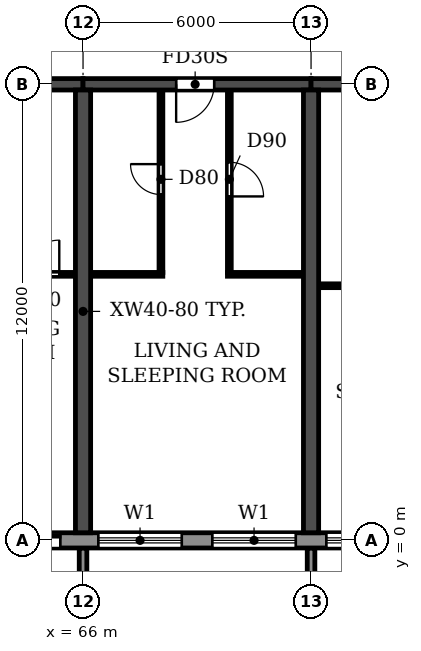
"""IFC4 building model, lengths in metres.
Left out: names, types, materials, properties, quantities, classifications, styles, units other than length and angle.
Written with IfcOpenShell. Run it as: python <this file> out.ifc"""

import sys

from ifc_helpers import new_model, si_unit, direction, frame, frame_2d, origin, place, context, subcontext, project, spatial, polyline, rectangle, outline, extrude, source, transform, mapped, element, fill, save


model = new_model("IFC4")
c1 = context("Model", 3, precision=1e-05, world=origin(), true_north=direction((0.0, 1.0)))
c2 = subcontext(c1, "Body", "Model", "MODEL_VIEW")
j1 = project(units=[si_unit("LENGTHUNIT", "METRE"), si_unit("PLANEANGLEUNIT", "RADIAN")], contexts=[c1])
p1 = place(None, origin())
s1 = spatial("IfcSite", under=j1, at=p1, CompositionType="ELEMENT")
p2 = place(p1, origin())
s2 = spatial("IfcBuilding", under=s1, at=p2, CompositionType="ELEMENT")
p3 = place(p2, frame((0.0, 0.0, 26.7)))
s3 = spatial("IfcBuildingStorey", under=s2, at=p3, CompositionType="ELEMENT", Elevation=26.7)
for number, where, z_axis, x_axis in (
    (1, (66.0, 0.2, 0.0), (0.0, 0.0, 1.0), (0.0, 1.0, 0.0)),
    (2, (72.0, 0.2, 0.0), (0.0, 0.0, 1.0), (0.0, 1.0, 0.0)),
):
    element("IfcWall", number, at=place(p3, frame(where, z_axis=z_axis, x_axis=x_axis)), inside=s3, PredefinedType="SHEAR", context=c2, shape_type="SweptSolid", body=[
        extrude(rectangle(XDim=11.65, YDim=0.4, at=frame_2d((5.825, 0.0))), origin(), (0.0, 0.0, 1.0), 3.05),
    ])
p4 = place(p3, frame((60.0, 12.0, 0.0), z_axis=(0.0, 0.0, 1.0), x_axis=(1.0, 0.0, 0.0)))
e3 = element("IfcWall", 3, at=p4, inside=s3, PredefinedType="SHEAR", context=c2, shape_type="SweptSolid", body=[
    extrude(rectangle(XDim=6.0, YDim=0.3, at=frame_2d((3.0, 0.0))), origin(), (0.0, 0.0, 1.0), 2.45),
])
p5 = place(p4, frame((2.45, 0.0, 0.0)))
e4 = element("IfcOpeningElement", 4, at=p5, cuts=e3, PredefinedType="OPENING", context=c2, shape_type="SweptSolid", body=[
    extrude(rectangle(XDim=1.0, YDim=2.1, at=frame_2d((0.5, 1.05))), frame((0.0, 0.16, 0.0), z_axis=(0.0, -1.0, 0.0), x_axis=(1.0, 0.0, 0.0)), (0.0, 0.0, 1.0), 0.32),
])
p6 = place(p3, frame((66.0, 12.0, 0.0), z_axis=(0.0, 0.0, 1.0), x_axis=(1.0, 0.0, 0.0)))
e5 = element("IfcWall", 5, at=p6, inside=s3, PredefinedType="SHEAR", context=c2, shape_type="SweptSolid", body=[
    extrude(rectangle(XDim=6.0, YDim=0.3, at=frame_2d((3.0, 0.0))), origin(), (0.0, 0.0, 1.0), 2.45),
])
p7 = place(p6, frame((2.45, 0.0, 0.0)))
e6 = element("IfcOpeningElement", 6, at=p7, cuts=e5, PredefinedType="OPENING", context=c2, shape_type="SweptSolid", body=[
    extrude(rectangle(XDim=1.0, YDim=2.1, at=frame_2d((0.5, 1.05))), frame((0.0, 0.16, 0.0), z_axis=(0.0, -1.0, 0.0), x_axis=(1.0, 0.0, 0.0)), (0.0, 0.0, 1.0), 0.32),
])
p8 = place(p3, frame((72.0, 12.0, 0.0), z_axis=(0.0, 0.0, 1.0), x_axis=(1.0, 0.0, 0.0)))
e7 = element("IfcWall", 7, at=p8, inside=s3, PredefinedType="SHEAR", context=c2, shape_type="SweptSolid", body=[
    extrude(rectangle(XDim=6.0, YDim=0.3, at=frame_2d((3.0, 0.0))), origin(), (0.0, 0.0, 1.0), 2.45),
])
p9 = place(p8, frame((2.55, 0.0, 0.0)))
e8 = element("IfcOpeningElement", 8, at=p9, cuts=e7, PredefinedType="OPENING", context=c2, shape_type="SweptSolid", body=[
    extrude(rectangle(XDim=1.0, YDim=2.1, at=frame_2d((0.5, 1.05))), frame((0.0, 0.16, 0.0), z_axis=(0.0, -1.0, 0.0), x_axis=(1.0, 0.0, 0.0)), (0.0, 0.0, 1.0), 0.32),
])
p10 = place(p3, frame((4.683, 0.0, 0.0), z_axis=(0.0, 0.0, 1.0), x_axis=(1.0, 0.0, 0.0)))
e9 = element("IfcWall", 9, at=p10, inside=s3, PredefinedType="STANDARD", context=c2, shape_type="SweptSolid", body=[
    extrude(rectangle(XDim=92.634, YDim=0.4, at=frame_2d((46.317, 0.0))), origin(), (0.0, 0.0, 1.0), 3.05),
])
p11 = place(p10, frame((1.717, 0.0, 0.9)))
e10 = element("IfcOpeningElement", 10, at=p11, cuts=e9, PredefinedType="OPENING", context=c2, shape_type="SweptSolid", body=[
    extrude(rectangle(XDim=2.2, YDim=1.5, at=frame_2d((1.1, 0.75))), frame((0.0, 0.21, 0.0), z_axis=(0.0, -1.0, 0.0), x_axis=(1.0, 0.0, 0.0)), (0.0, 0.0, 1.0), 0.42),
])
p12 = place(p10, frame((4.717, 0.0, 0.9)))
e11 = element("IfcOpeningElement", 11, at=p12, cuts=e9, PredefinedType="OPENING", context=c2, shape_type="SweptSolid", body=[
    extrude(rectangle(XDim=2.2, YDim=1.5, at=frame_2d((1.1, 0.75))), frame((0.0, 0.21, 0.0), z_axis=(0.0, -1.0, 0.0), x_axis=(1.0, 0.0, 0.0)), (0.0, 0.0, 1.0), 0.42),
])
p13 = place(p10, frame((7.717, 0.0, 0.9)))
e12 = element("IfcOpeningElement", 12, at=p13, cuts=e9, PredefinedType="OPENING", context=c2, shape_type="SweptSolid", body=[
    extrude(rectangle(XDim=2.2, YDim=1.5, at=frame_2d((1.1, 0.75))), frame((0.0, 0.21, 0.0), z_axis=(0.0, -1.0, 0.0), x_axis=(1.0, 0.0, 0.0)), (0.0, 0.0, 1.0), 0.42),
])
p14 = place(p10, frame((10.717, 0.0, 0.9)))
e13 = element("IfcOpeningElement", 13, at=p14, cuts=e9, PredefinedType="OPENING", context=c2, shape_type="SweptSolid", body=[
    extrude(rectangle(XDim=2.2, YDim=1.5, at=frame_2d((1.1, 0.75))), frame((0.0, 0.21, 0.0), z_axis=(0.0, -1.0, 0.0), x_axis=(1.0, 0.0, 0.0)), (0.0, 0.0, 1.0), 0.42),
])
p15 = place(p10, frame((13.717, 0.0, 0.9)))
e14 = element("IfcOpeningElement", 14, at=p15, cuts=e9, PredefinedType="OPENING", context=c2, shape_type="SweptSolid", body=[
    extrude(rectangle(XDim=2.2, YDim=1.5, at=frame_2d((1.1, 0.75))), frame((0.0, 0.21, 0.0), z_axis=(0.0, -1.0, 0.0), x_axis=(1.0, 0.0, 0.0)), (0.0, 0.0, 1.0), 0.42),
])
p16 = place(p10, frame((16.717, 0.0, 0.9)))
e15 = element("IfcOpeningElement", 15, at=p16, cuts=e9, PredefinedType="OPENING", context=c2, shape_type="SweptSolid", body=[
    extrude(rectangle(XDim=2.2, YDim=1.5, at=frame_2d((1.1, 0.75))), frame((0.0, 0.21, 0.0), z_axis=(0.0, -1.0, 0.0), x_axis=(1.0, 0.0, 0.0)), (0.0, 0.0, 1.0), 0.42),
])
p17 = place(p10, frame((19.917, 0.0, 0.0)))
e16 = element("IfcOpeningElement", 16, at=p17, cuts=e9, PredefinedType="OPENING", context=c2, shape_type="SweptSolid", body=[
    extrude(rectangle(XDim=1.8, YDim=2.4, at=frame_2d((0.9, 1.2))), frame((0.0, 0.21, 0.0), z_axis=(0.0, -1.0, 0.0), x_axis=(1.0, 0.0, 0.0)), (0.0, 0.0, 1.0), 0.42),
])
p18 = place(p10, frame((22.717, 0.0, 0.9)))
e17 = element("IfcOpeningElement", 17, at=p18, cuts=e9, PredefinedType="OPENING", context=c2, shape_type="SweptSolid", body=[
    extrude(rectangle(XDim=2.2, YDim=1.5, at=frame_2d((1.1, 0.75))), frame((0.0, 0.21, 0.0), z_axis=(0.0, -1.0, 0.0), x_axis=(1.0, 0.0, 0.0)), (0.0, 0.0, 1.0), 0.42),
])
p19 = place(p10, frame((25.717, 0.0, 0.9)))
e18 = element("IfcOpeningElement", 18, at=p19, cuts=e9, PredefinedType="OPENING", context=c2, shape_type="SweptSolid", body=[
    extrude(rectangle(XDim=2.2, YDim=1.5, at=frame_2d((1.1, 0.75))), frame((0.0, 0.21, 0.0), z_axis=(0.0, -1.0, 0.0), x_axis=(1.0, 0.0, 0.0)), (0.0, 0.0, 1.0), 0.42),
])
p20 = place(p10, frame((28.717, 0.0, 0.9)))
e19 = element("IfcOpeningElement", 19, at=p20, cuts=e9, PredefinedType="OPENING", context=c2, shape_type="SweptSolid", body=[
    extrude(rectangle(XDim=2.2, YDim=1.5, at=frame_2d((1.1, 0.75))), frame((0.0, 0.21, 0.0), z_axis=(0.0, -1.0, 0.0), x_axis=(1.0, 0.0, 0.0)), (0.0, 0.0, 1.0), 0.42),
])
p21 = place(p10, frame((31.917, 0.0, 0.0)))
e20 = element("IfcOpeningElement", 20, at=p21, cuts=e9, PredefinedType="OPENING", context=c2, shape_type="SweptSolid", body=[
    extrude(rectangle(XDim=1.8, YDim=2.4, at=frame_2d((0.9, 1.2))), frame((0.0, 0.21, 0.0), z_axis=(0.0, -1.0, 0.0), x_axis=(1.0, 0.0, 0.0)), (0.0, 0.0, 1.0), 0.42),
])
p22 = place(p10, frame((34.717, 0.0, 0.9)))
e21 = element("IfcOpeningElement", 21, at=p22, cuts=e9, PredefinedType="OPENING", context=c2, shape_type="SweptSolid", body=[
    extrude(rectangle(XDim=2.2, YDim=1.5, at=frame_2d((1.1, 0.75))), frame((0.0, 0.21, 0.0), z_axis=(0.0, -1.0, 0.0), x_axis=(1.0, 0.0, 0.0)), (0.0, 0.0, 1.0), 0.42),
])
p23 = place(p10, frame((37.717, 0.0, 0.9)))
e22 = element("IfcOpeningElement", 22, at=p23, cuts=e9, PredefinedType="OPENING", context=c2, shape_type="SweptSolid", body=[
    extrude(rectangle(XDim=2.2, YDim=1.5, at=frame_2d((1.1, 0.75))), frame((0.0, 0.21, 0.0), z_axis=(0.0, -1.0, 0.0), x_axis=(1.0, 0.0, 0.0)), (0.0, 0.0, 1.0), 0.42),
])
p24 = place(p10, frame((40.717, 0.0, 0.9)))
e23 = element("IfcOpeningElement", 23, at=p24, cuts=e9, PredefinedType="OPENING", context=c2, shape_type="SweptSolid", body=[
    extrude(rectangle(XDim=2.2, YDim=1.5, at=frame_2d((1.1, 0.75))), frame((0.0, 0.21, 0.0), z_axis=(0.0, -1.0, 0.0), x_axis=(1.0, 0.0, 0.0)), (0.0, 0.0, 1.0), 0.42),
])
p25 = place(p10, frame((43.917, 0.0, 0.0)))
e24 = element("IfcOpeningElement", 24, at=p25, cuts=e9, PredefinedType="OPENING", context=c2, shape_type="SweptSolid", body=[
    extrude(rectangle(XDim=1.8, YDim=2.4, at=frame_2d((0.9, 1.2))), frame((0.0, 0.21, 0.0), z_axis=(0.0, -1.0, 0.0), x_axis=(1.0, 0.0, 0.0)), (0.0, 0.0, 1.0), 0.42),
])
p26 = place(p10, frame((46.717, 0.0, 0.9)))
e25 = element("IfcOpeningElement", 25, at=p26, cuts=e9, PredefinedType="OPENING", context=c2, shape_type="SweptSolid", body=[
    extrude(rectangle(XDim=2.2, YDim=1.5, at=frame_2d((1.1, 0.75))), frame((0.0, 0.21, 0.0), z_axis=(0.0, -1.0, 0.0), x_axis=(1.0, 0.0, 0.0)), (0.0, 0.0, 1.0), 0.42),
])
p27 = place(p10, frame((49.717, 0.0, 0.9)))
e26 = element("IfcOpeningElement", 26, at=p27, cuts=e9, PredefinedType="OPENING", context=c2, shape_type="SweptSolid", body=[
    extrude(rectangle(XDim=2.2, YDim=1.5, at=frame_2d((1.1, 0.75))), frame((0.0, 0.21, 0.0), z_axis=(0.0, -1.0, 0.0), x_axis=(1.0, 0.0, 0.0)), (0.0, 0.0, 1.0), 0.42),
])
p28 = place(p10, frame((52.717, 0.0, 0.9)))
e27 = element("IfcOpeningElement", 27, at=p28, cuts=e9, PredefinedType="OPENING", context=c2, shape_type="SweptSolid", body=[
    extrude(rectangle(XDim=2.2, YDim=1.5, at=frame_2d((1.1, 0.75))), frame((0.0, 0.21, 0.0), z_axis=(0.0, -1.0, 0.0), x_axis=(1.0, 0.0, 0.0)), (0.0, 0.0, 1.0), 0.42),
])
p29 = place(p10, frame((55.717, 0.0, 0.9)))
e28 = element("IfcOpeningElement", 28, at=p29, cuts=e9, PredefinedType="OPENING", context=c2, shape_type="SweptSolid", body=[
    extrude(rectangle(XDim=2.2, YDim=1.5, at=frame_2d((1.1, 0.75))), frame((0.0, 0.21, 0.0), z_axis=(0.0, -1.0, 0.0), x_axis=(1.0, 0.0, 0.0)), (0.0, 0.0, 1.0), 0.42),
])
p30 = place(p10, frame((58.917, 0.0, 0.0)))
e29 = element("IfcOpeningElement", 29, at=p30, cuts=e9, PredefinedType="OPENING", context=c2, shape_type="SweptSolid", body=[
    extrude(rectangle(XDim=1.8, YDim=2.4, at=frame_2d((0.9, 1.2))), frame((0.0, 0.21, 0.0), z_axis=(0.0, -1.0, 0.0), x_axis=(1.0, 0.0, 0.0)), (0.0, 0.0, 1.0), 0.42),
])
p31 = place(p10, frame((61.717, 0.0, 0.9)))
e30 = element("IfcOpeningElement", 30, at=p31, cuts=e9, PredefinedType="OPENING", context=c2, shape_type="SweptSolid", body=[
    extrude(rectangle(XDim=2.2, YDim=1.5, at=frame_2d((1.1, 0.75))), frame((0.0, 0.21, 0.0), z_axis=(0.0, -1.0, 0.0), x_axis=(1.0, 0.0, 0.0)), (0.0, 0.0, 1.0), 0.42),
])
p32 = place(p10, frame((64.717, 0.0, 0.9)))
e31 = element("IfcOpeningElement", 31, at=p32, cuts=e9, PredefinedType="OPENING", context=c2, shape_type="SweptSolid", body=[
    extrude(rectangle(XDim=2.2, YDim=1.5, at=frame_2d((1.1, 0.75))), frame((0.0, 0.21, 0.0), z_axis=(0.0, -1.0, 0.0), x_axis=(1.0, 0.0, 0.0)), (0.0, 0.0, 1.0), 0.42),
])
p33 = place(p10, frame((67.717, 0.0, 0.9)))
e32 = element("IfcOpeningElement", 32, at=p33, cuts=e9, PredefinedType="OPENING", context=c2, shape_type="SweptSolid", body=[
    extrude(rectangle(XDim=2.2, YDim=1.5, at=frame_2d((1.1, 0.75))), frame((0.0, 0.21, 0.0), z_axis=(0.0, -1.0, 0.0), x_axis=(1.0, 0.0, 0.0)), (0.0, 0.0, 1.0), 0.42),
])
p34 = place(p10, frame((70.917, 0.0, 0.0)))
e33 = element("IfcOpeningElement", 33, at=p34, cuts=e9, PredefinedType="OPENING", context=c2, shape_type="SweptSolid", body=[
    extrude(rectangle(XDim=1.8, YDim=2.4, at=frame_2d((0.9, 1.2))), frame((0.0, 0.21, 0.0), z_axis=(0.0, -1.0, 0.0), x_axis=(1.0, 0.0, 0.0)), (0.0, 0.0, 1.0), 0.42),
])
p35 = place(p10, frame((73.717, 0.0, 0.9)))
e34 = element("IfcOpeningElement", 34, at=p35, cuts=e9, PredefinedType="OPENING", context=c2, shape_type="SweptSolid", body=[
    extrude(rectangle(XDim=2.2, YDim=1.5, at=frame_2d((1.1, 0.75))), frame((0.0, 0.21, 0.0), z_axis=(0.0, -1.0, 0.0), x_axis=(1.0, 0.0, 0.0)), (0.0, 0.0, 1.0), 0.42),
])
p36 = place(p10, frame((76.717, 0.0, 0.9)))
e35 = element("IfcOpeningElement", 35, at=p36, cuts=e9, PredefinedType="OPENING", context=c2, shape_type="SweptSolid", body=[
    extrude(rectangle(XDim=2.2, YDim=1.5, at=frame_2d((1.1, 0.75))), frame((0.0, 0.21, 0.0), z_axis=(0.0, -1.0, 0.0), x_axis=(1.0, 0.0, 0.0)), (0.0, 0.0, 1.0), 0.42),
])
p37 = place(p10, frame((79.717, 0.0, 0.9)))
e36 = element("IfcOpeningElement", 36, at=p37, cuts=e9, PredefinedType="OPENING", context=c2, shape_type="SweptSolid", body=[
    extrude(rectangle(XDim=2.2, YDim=1.5, at=frame_2d((1.1, 0.75))), frame((0.0, 0.21, 0.0), z_axis=(0.0, -1.0, 0.0), x_axis=(1.0, 0.0, 0.0)), (0.0, 0.0, 1.0), 0.42),
])
p38 = place(p10, frame((82.717, 0.0, 0.9)))
e37 = element("IfcOpeningElement", 37, at=p38, cuts=e9, PredefinedType="OPENING", context=c2, shape_type="SweptSolid", body=[
    extrude(rectangle(XDim=2.2, YDim=1.5, at=frame_2d((1.1, 0.75))), frame((0.0, 0.21, 0.0), z_axis=(0.0, -1.0, 0.0), x_axis=(1.0, 0.0, 0.0)), (0.0, 0.0, 1.0), 0.42),
])
p39 = place(p10, frame((85.717, 0.0, 0.9)))
e38 = element("IfcOpeningElement", 38, at=p39, cuts=e9, PredefinedType="OPENING", context=c2, shape_type="SweptSolid", body=[
    extrude(rectangle(XDim=2.2, YDim=1.5, at=frame_2d((1.1, 0.75))), frame((0.0, 0.21, 0.0), z_axis=(0.0, -1.0, 0.0), x_axis=(1.0, 0.0, 0.0)), (0.0, 0.0, 1.0), 0.42),
])
p40 = place(p10, frame((88.717, 0.0, 0.9)))
e39 = element("IfcOpeningElement", 39, at=p40, cuts=e9, PredefinedType="OPENING", context=c2, shape_type="SweptSolid", body=[
    extrude(rectangle(XDim=2.2, YDim=1.5, at=frame_2d((1.1, 0.75))), frame((0.0, 0.21, 0.0), z_axis=(0.0, -1.0, 0.0), x_axis=(1.0, 0.0, 0.0)), (0.0, 0.0, 1.0), 0.42),
])
m1 = source(origin(), c2, "Body", "SweptSolid", [
    extrude(outline(polyline([(0.0, 0.0), (0.2, 0.0), (0.2, 1.65), (0.0, 1.65), (0.0, 0.0)])), origin(), (0.0, 0.0, 1.0), 3.1),
])
for number, where in (
    (40, (65.9, -1.85, 0.0)),
    (41, (71.9, -1.85, 0.0)),
):
    element("IfcWall", number, at=place(p3, frame(where)), inside=s3, PredefinedType="STANDARD", context=c2, shape_type="MappedRepresentation", body=[
        mapped(m1, transform((0.0, 0.0, 0.0))),
    ])
p41 = place(p3, frame((72.21, 6.7, 0.0), z_axis=(0.0, 0.0, 1.0), x_axis=(1.0, 0.0, 0.0)))
e42 = element("IfcWall", 42, at=p41, inside=s3, PredefinedType="PARTITIONING", context=c2, shape_type="SweptSolid", body=[
    extrude(rectangle(XDim=1.99, YDim=0.1, at=frame_2d((0.995, 0.0))), origin(), (0.0, 0.0, 1.0), 3.05),
])
p42 = place(p3, frame((63.8, 7.0, 0.0), z_axis=(0.0, 0.0, 1.0), x_axis=(1.0, 0.0, 0.0)))
e43 = element("IfcWall", 43, at=p42, inside=s3, PredefinedType="PARTITIONING", context=c2, shape_type="SweptSolid", body=[
    extrude(rectangle(XDim=1.99, YDim=0.1, at=frame_2d((0.995, 0.0))), origin(), (0.0, 0.0, 1.0), 3.05),
])
p43 = place(p42, frame((0.675, 0.0, 0.0)))
e44 = element("IfcOpeningElement", 44, at=p43, cuts=e43, PredefinedType="OPENING", context=c2, shape_type="SweptSolid", body=[
    extrude(rectangle(XDim=0.9, YDim=2.1, at=frame_2d((0.45, 1.05))), frame((0.0, 0.06, 0.0), z_axis=(0.0, -1.0, 0.0), x_axis=(1.0, 0.0, 0.0)), (0.0, 0.0, 1.0), 0.12),
])
p44 = place(p3, frame((66.21, 7.0, 0.0), z_axis=(0.0, 0.0, 1.0), x_axis=(1.0, 0.0, 0.0)))
e45 = element("IfcWall", 45, at=p44, inside=s3, PredefinedType="PARTITIONING", context=c2, shape_type="SweptSolid", body=[
    extrude(rectangle(XDim=1.89, YDim=0.1, at=frame_2d((0.945, 0.0))), origin(), (0.0, 0.0, 1.0), 3.05),
])
p45 = place(p3, frame((69.8, 7.0, 0.0), z_axis=(0.0, 0.0, 1.0), x_axis=(1.0, 0.0, 0.0)))
e46 = element("IfcWall", 46, at=p45, inside=s3, PredefinedType="PARTITIONING", context=c2, shape_type="SweptSolid", body=[
    extrude(rectangle(XDim=1.99, YDim=0.1, at=frame_2d((0.995, 0.0))), origin(), (0.0, 0.0, 1.0), 3.05),
])
p46 = place(p3, frame((68.05, 7.05, 0.0), z_axis=(0.0, 0.0, 1.0), x_axis=(0.0, 1.0, 0.0)))
e47 = element("IfcWall", 47, at=p46, inside=s3, PredefinedType="PARTITIONING", context=c2, shape_type="SweptSolid", body=[
    extrude(rectangle(XDim=4.79, YDim=0.1, at=frame_2d((2.395, 0.0))), origin(), (0.0, 0.0, 1.0), 3.05),
])
p47 = place(p46, frame((2.05, 0.0, 0.0)))
e48 = element("IfcOpeningElement", 48, at=p47, cuts=e47, PredefinedType="OPENING", context=c2, shape_type="SweptSolid", body=[
    extrude(rectangle(XDim=0.8, YDim=2.1, at=frame_2d((0.4, 1.05))), frame((0.0, 0.06, 0.0), z_axis=(0.0, -1.0, 0.0), x_axis=(1.0, 0.0, 0.0)), (0.0, 0.0, 1.0), 0.12),
])
p48 = place(p3, frame((69.85, 7.05, 0.0), z_axis=(0.0, 0.0, 1.0), x_axis=(0.0, 1.0, 0.0)))
e49 = element("IfcWall", 49, at=p48, inside=s3, PredefinedType="PARTITIONING", context=c2, shape_type="SweptSolid", body=[
    extrude(rectangle(XDim=4.79, YDim=0.1, at=frame_2d((2.395, 0.0))), origin(), (0.0, 0.0, 1.0), 3.05),
])
p49 = place(p48, frame((2.0, 0.0, 0.0)))
e50 = element("IfcOpeningElement", 50, at=p49, cuts=e49, PredefinedType="OPENING", context=c2, shape_type="SweptSolid", body=[
    extrude(rectangle(XDim=0.9, YDim=2.1, at=frame_2d((0.45, 1.05))), frame((0.0, 0.06, 0.0), z_axis=(0.0, -1.0, 0.0), x_axis=(1.0, 0.0, 0.0)), (0.0, 0.0, 1.0), 0.12),
])
p50 = place(p30, origin())
e51 = element("IfcDoor", 51, at=p50, inside=s3, OperationType="DOUBLE_DOOR_SLIDING", PredefinedType="DOOR", context=c2, shape_type="SweptSolid", body=[
    extrude(rectangle(XDim=1.8, YDim=2.4, at=frame_2d((0.9, 1.2))), frame((0.0, 0.025, 0.0), z_axis=(0.0, -1.0, 0.0), x_axis=(1.0, 0.0, 0.0)), (0.0, 0.0, 1.0), 0.05),
])
fill(e29, e51)
p51 = place(p31, origin())
e52 = element("IfcWindow", 52, at=p51, inside=s3, PartitioningType="DOUBLE_PANEL_HORIZONTAL", PredefinedType="WINDOW", context=c2, shape_type="SweptSolid", body=[
    extrude(rectangle(XDim=2.2, YDim=1.5, at=frame_2d((1.1, 0.75))), frame((0.0, 0.03, 0.0), z_axis=(0.0, -1.0, 0.0), x_axis=(1.0, 0.0, 0.0)), (0.0, 0.0, 1.0), 0.06),
])
fill(e30, e52)
p52 = place(p32, origin())
e53 = element("IfcWindow", 53, at=p52, inside=s3, PartitioningType="DOUBLE_PANEL_HORIZONTAL", PredefinedType="WINDOW", context=c2, shape_type="SweptSolid", body=[
    extrude(rectangle(XDim=2.2, YDim=1.5, at=frame_2d((1.1, 0.75))), frame((0.0, 0.03, 0.0), z_axis=(0.0, -1.0, 0.0), x_axis=(1.0, 0.0, 0.0)), (0.0, 0.0, 1.0), 0.06),
])
fill(e31, e53)
p53 = place(p33, origin())
e54 = element("IfcWindow", 54, at=p53, inside=s3, PartitioningType="DOUBLE_PANEL_HORIZONTAL", PredefinedType="WINDOW", context=c2, shape_type="SweptSolid", body=[
    extrude(rectangle(XDim=2.2, YDim=1.5, at=frame_2d((1.1, 0.75))), frame((0.0, 0.03, 0.0), z_axis=(0.0, -1.0, 0.0), x_axis=(1.0, 0.0, 0.0)), (0.0, 0.0, 1.0), 0.06),
])
fill(e32, e54)
p54 = place(p43, origin())
e55 = element("IfcDoor", 55, at=p54, inside=s3, OperationType="SINGLE_SWING_RIGHT", PredefinedType="DOOR", context=c2, shape_type="SweptSolid", body=[
    extrude(rectangle(XDim=0.9, YDim=2.1, at=frame_2d((0.45, 1.05))), frame((0.0, 0.025, 0.0), z_axis=(0.0, -1.0, 0.0), x_axis=(1.0, 0.0, 0.0)), (0.0, 0.0, 1.0), 0.05),
])
fill(e44, e55)
p55 = place(p47, origin())
e56 = element("IfcDoor", 56, at=p55, inside=s3, OperationType="SINGLE_SWING_RIGHT", PredefinedType="DOOR", context=c2, shape_type="SweptSolid", body=[
    extrude(rectangle(XDim=0.8, YDim=2.1, at=frame_2d((0.4, 1.05))), frame((0.0, 0.025, 0.0), z_axis=(0.0, -1.0, 0.0), x_axis=(1.0, 0.0, 0.0)), (0.0, 0.0, 1.0), 0.05),
])
fill(e48, e56)
p56 = place(p7, frame((1.0, 0.0, 0.0), z_axis=(0.0, 0.0, 1.0), x_axis=(-1.0, 0.0, 0.0)))
e57 = element("IfcDoor", 57, at=p56, inside=s3, OperationType="SINGLE_SWING_RIGHT", PredefinedType="DOOR", context=c2, shape_type="SweptSolid", body=[
    extrude(rectangle(XDim=1.0, YDim=2.1, at=frame_2d((0.5, 1.05))), frame((0.0, 0.025, 0.0), z_axis=(0.0, -1.0, 0.0), x_axis=(1.0, 0.0, 0.0)), (0.0, 0.0, 1.0), 0.05),
])
fill(e6, e57)
p57 = place(p49, frame((0.9, 0.0, 0.0), z_axis=(0.0, 0.0, 1.0), x_axis=(-1.0, 0.0, 0.0)))
e58 = element("IfcDoor", 58, at=p57, inside=s3, OperationType="SINGLE_SWING_RIGHT", PredefinedType="DOOR", context=c2, shape_type="SweptSolid", body=[
    extrude(rectangle(XDim=0.9, YDim=2.1, at=frame_2d((0.45, 1.05))), frame((0.0, 0.025, 0.0), z_axis=(0.0, -1.0, 0.0), x_axis=(1.0, 0.0, 0.0)), (0.0, 0.0, 1.0), 0.05),
])
fill(e50, e58)
save(model, sys.argv[1])
